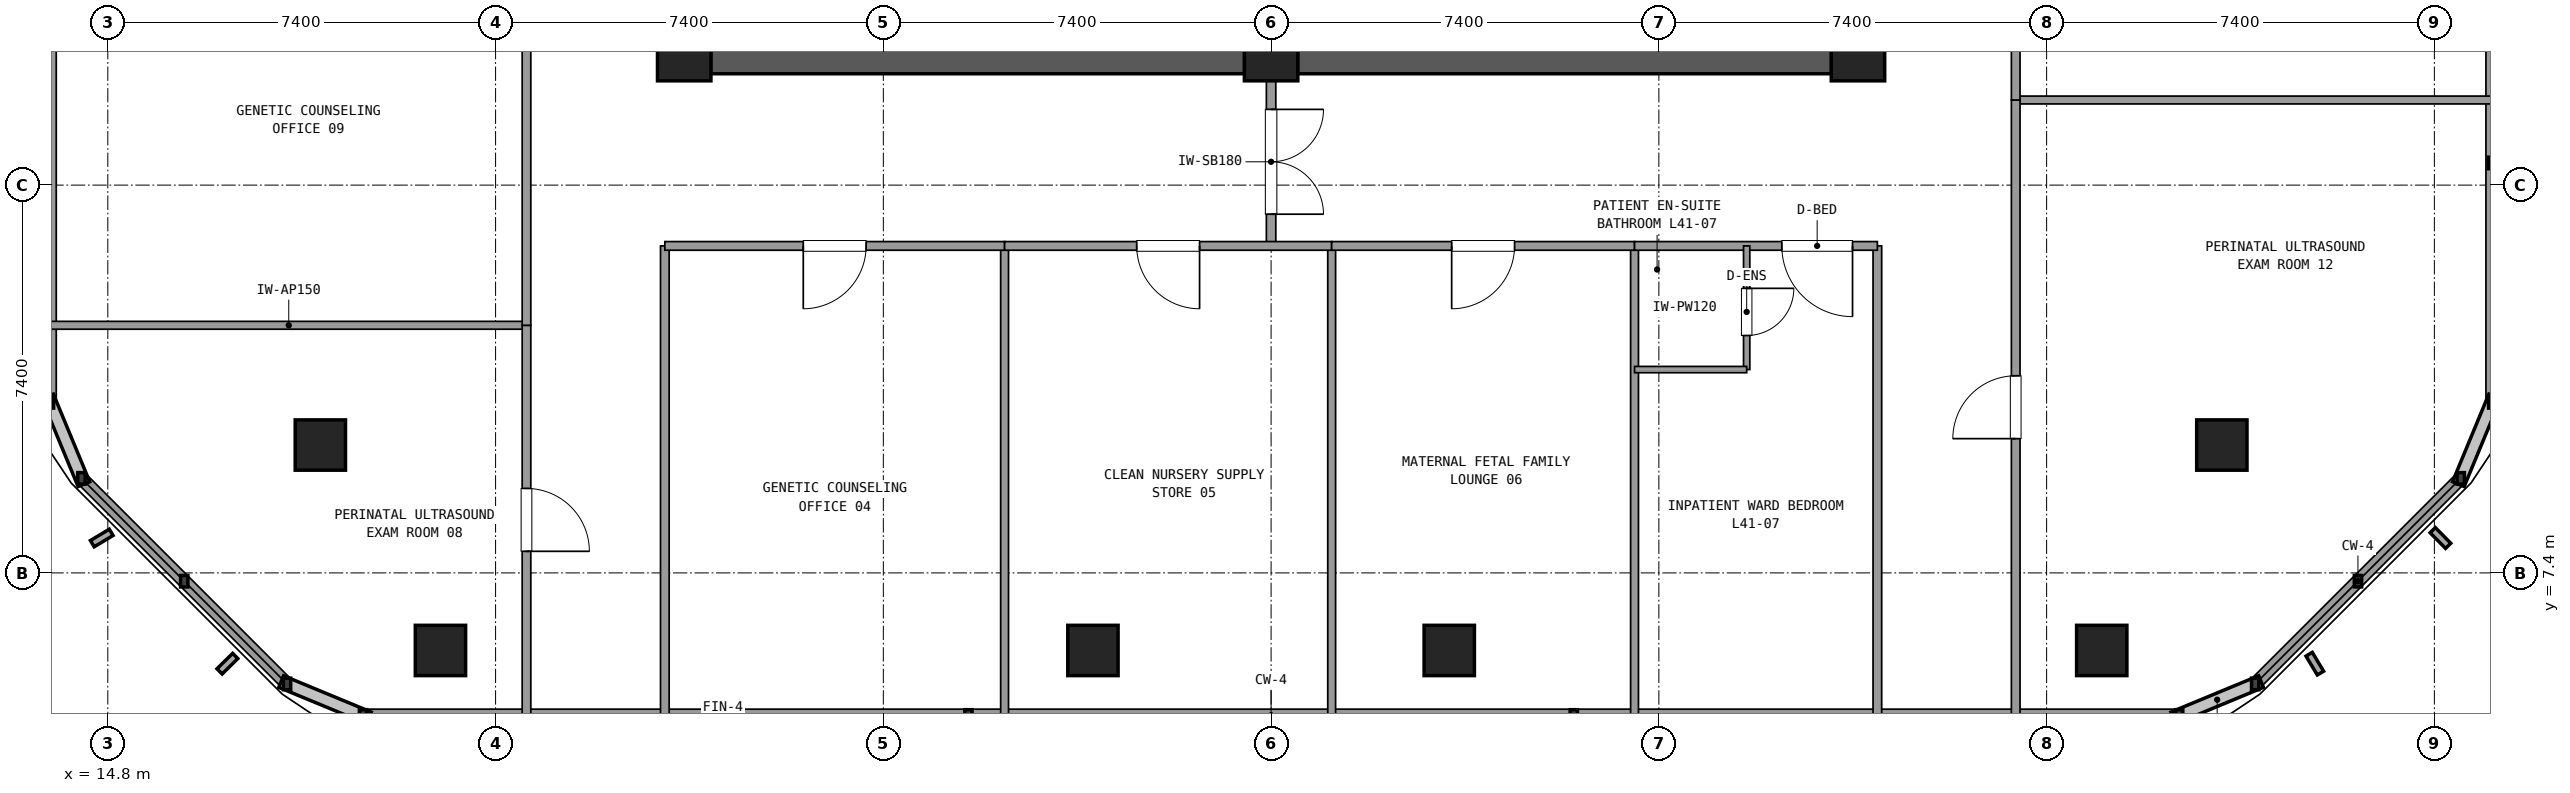
"""IFC4 building model, lengths in metres.
Left out: names, types, materials, properties, quantities, classifications, styles, units other than length and angle.
Written with IfcOpenShell. Run it as: python <this file> out.ifc"""

import sys

from ifc_helpers import new_model, si_unit, direction, frame, frame_2d, origin, origin_2d, place, context, subcontext, project, spatial, rectangle, extrude, element, fill, save


model = new_model("IFC4")
c1 = context("Model", 3, precision=1e-05, world=origin(), true_north=direction((0.0, 1.0)))
c2 = subcontext(c1, "Body", "Model", "MODEL_VIEW")
j1 = project(units=[si_unit("LENGTHUNIT", "METRE"), si_unit("PLANEANGLEUNIT", "RADIAN")], contexts=[c1])
p1 = place(None, origin())
s1 = spatial("IfcSite", under=j1, at=p1, CompositionType="ELEMENT")
p2 = place(p1, origin())
s2 = spatial("IfcBuilding", under=s1, at=p2, CompositionType="ELEMENT")
p3 = place(p2, frame((0.0, 0.0, 160.02)))
s3 = spatial("IfcBuildingStorey", under=s2, at=p3, CompositionType="ELEMENT", Elevation=160.02)
for number, where, z_axis, x_axis in (
    (1, (25.8, 17.3, 0.0), (0.0, 0.0, 1.0), (1.0, 0.0, 0.0)),
    (2, (37.0, 17.3, 0.0), (0.0, 0.0, 1.0), (1.0, 0.0, 0.0)),
    (3, (48.2, 17.3, 0.0), (0.0, 0.0, 1.0), (1.0, 0.0, 0.0)),
):
    element("IfcColumn", number, at=place(p3, frame(where, z_axis=z_axis, x_axis=x_axis)), inside=s3, PredefinedType="COLUMN", context=c2, shape_type="SweptSolid", body=[
        extrude(rectangle(XDim=1.02, YDim=1.02, at=origin_2d()), origin(), (0.0, 0.0, 1.0), 3.6),
    ])
for number, where, z_axis, x_axis in (
    (4, (26.305, 17.3, 0.0), (0.0, 0.0, 1.0), (1.0, 0.0, 0.0)),
    (5, (37.505, 17.3, 0.0), (0.0, 0.0, 1.0), (1.0, 0.0, 0.0)),
):
    element("IfcWall", number, at=place(p3, frame(where, z_axis=z_axis, x_axis=x_axis)), inside=s3, PredefinedType="SHEAR", context=c2, shape_type="SweptSolid", body=[
        extrude(rectangle(XDim=10.19, YDim=0.75, at=frame_2d((5.095, 0.0))), origin(), (0.0, 0.0, 1.0), 3.32),
    ])
for number, where, z_axis, x_axis in (
    (6, (18.856, 9.84, 0.0), (0.0, 0.0, 1.0), (1.0, 0.0, 0.0)),
    (7, (21.148, 5.92, 0.0), (0.0, 0.0, 1.0), (1.0, 0.0, 0.0)),
    (8, (33.6, 5.92, 0.0), (0.0, 0.0, 1.0), (1.0, 0.0, 0.0)),
    (9, (40.4, 5.92, 0.0), (0.0, 0.0, 1.0), (1.0, 0.0, 0.0)),
    (10, (52.852, 5.92, 0.0), (0.0, 0.0, 1.0), (1.0, 0.0, 0.0)),
    (11, (55.144, 9.84, 0.0), (0.0, 0.0, 1.0), (1.0, 0.0, 0.0)),
):
    element("IfcColumn", number, at=place(p3, frame(where, z_axis=z_axis, x_axis=x_axis)), inside=s3, PredefinedType="COLUMN", context=c2, shape_type="SweptSolid", body=[
        extrude(rectangle(XDim=0.96, YDim=0.96, at=origin_2d()), origin(), (0.0, 0.0, 1.0), 3.6),
    ])
p4 = place(p3, frame((19.671, 4.68, 0.0), z_axis=(0.0, 0.0, 1.0), x_axis=(1.0, 0.0, 0.0)))
e12 = element("IfcWall", 12, at=p4, inside=s3, PredefinedType="SOLIDWALL", context=c2, shape_type="SweptSolid", body=[
    extrude(rectangle(XDim=34.658, YDim=0.24, at=frame_2d((17.329, 0.0))), origin(), (0.0, 0.0, 1.0), 0.85),
])
p5 = place(p3, frame((55.78, 5.281, 0.0), z_axis=(0.0, 0.0, 1.0), x_axis=(0.707084777957, 0.707128783731, 0.0)))
e13 = element("IfcWall", 13, at=p5, inside=s3, PredefinedType="SOLIDWALL", context=c2, shape_type="SweptSolid", body=[
    extrude(rectangle(XDim=5.548, YDim=0.24, at=frame_2d((2.774, 0.0))), origin(), (0.0, 0.0, 1.0), 0.85),
])
p6 = place(p3, frame((60.304, 10.655, 0.0), z_axis=(0.0, 0.0, 1.0), x_axis=(0.0, 1.0, 0.0)))
e14 = element("IfcWall", 14, at=p6, inside=s3, PredefinedType="SOLIDWALL", context=c2, shape_type="SweptSolid", body=[
    extrude(rectangle(XDim=13.705, YDim=0.24, at=frame_2d((6.853, 0.0))), origin(), (0.0, 0.0, 1.0), 0.85),
])
p7 = place(p3, frame((13.696, 41.145, 0.0), z_axis=(0.0, 0.0, 1.0), x_axis=(0.0, -1.0, 0.0)))
e15 = element("IfcWall", 15, at=p7, inside=s3, PredefinedType="SOLIDWALL", context=c2, shape_type="SweptSolid", body=[
    extrude(rectangle(XDim=30.49, YDim=0.24, at=frame_2d((15.245, 0.0))), origin(), (0.0, 0.0, 1.0), 0.85),
])
p8 = place(p3, frame((14.297, 9.204, 0.0), z_axis=(0.0, 0.0, 1.0), x_axis=(0.707084777957, -0.707128783731, 0.0)))
e16 = element("IfcWall", 16, at=p8, inside=s3, PredefinedType="SOLIDWALL", context=c2, shape_type="SweptSolid", body=[
    extrude(rectangle(XDim=5.548, YDim=0.24, at=frame_2d((2.774, 0.0))), origin(), (0.0, 0.0, 1.0), 0.85),
])
p9 = place(p3, frame((37.0, 13.64, 0.0), z_axis=(0.0, 0.0, 1.0), x_axis=(0.0, 1.0, 0.0)))
e17 = element("IfcWall", 17, at=p9, inside=s3, PredefinedType="PARTITIONING", context=c2, shape_type="SweptSolid", body=[
    extrude(rectangle(XDim=3.21, YDim=0.18, at=frame_2d((1.605, 0.0))), origin(), (0.0, 0.0, 1.0), 2.61),
])
p10 = place(p9, frame((0.605, 0.0, 0.0)))
e18 = element("IfcOpeningElement", 18, at=p10, cuts=e17, PredefinedType="OPENING", context=c2, shape_type="SweptSolid", body=[
    extrude(rectangle(XDim=2.0, YDim=2.2, at=frame_2d((1.0, 1.1))), frame((0.0, 0.1, 0.0), z_axis=(0.0, -1.0, 0.0), x_axis=(1.0, 0.0, 0.0)), (0.0, 0.0, 1.0), 0.2),
])
for number, where, z_axis, x_axis in (
    (19, (25.43, 4.7, 0.0), (0.0, 0.0, 1.0), (0.0, 1.0, 0.0)),
    (20, (48.57, 4.7, 0.0), (0.0, 0.0, 1.0), (0.0, 1.0, 0.0)),
):
    element("IfcWall", number, at=place(p3, frame(where, z_axis=z_axis, x_axis=x_axis)), inside=s3, PredefinedType="PARTITIONING", context=c2, shape_type="SweptSolid", body=[
        extrude(rectangle(XDim=8.94, YDim=0.165, at=frame_2d((4.47, 0.0))), origin(), (0.0, 0.0, 1.0), 2.61),
    ])
p11 = place(p3, frame((31.914, 13.64, 0.0), z_axis=(0.0, 0.0, 1.0), x_axis=(0.0, -1.0, 0.0)))
e21 = element("IfcWall", 21, at=p11, inside=s3, PredefinedType="PARTITIONING", context=c2, shape_type="SweptSolid", body=[
    extrude(rectangle(XDim=8.94, YDim=0.15, at=frame_2d((4.47, 0.0))), origin(), (0.0, 0.0, 1.0), 2.61),
])
p12 = place(p3, frame((25.43, 13.64, 0.0), z_axis=(0.0, 0.0, 1.0), x_axis=(1.0, 0.0, 0.0)))
e22 = element("IfcWall", 22, at=p12, inside=s3, PredefinedType="PARTITIONING", context=c2, shape_type="SweptSolid", body=[
    extrude(rectangle(XDim=6.484, YDim=0.165, at=frame_2d((3.242, 0.0))), origin(), (0.0, 0.0, 1.0), 2.61),
])
p13 = place(p12, frame((2.642, 0.0, 0.0)))
e23 = element("IfcOpeningElement", 23, at=p13, cuts=e22, PredefinedType="OPENING", context=c2, shape_type="SweptSolid", body=[
    extrude(rectangle(XDim=1.2, YDim=2.15, at=frame_2d((0.6, 1.075))), frame((0.0, 0.093, 0.0), z_axis=(0.0, -1.0, 0.0), x_axis=(1.0, 0.0, 0.0)), (0.0, 0.0, 1.0), 0.185),
])
p14 = place(p3, frame((38.156, 13.64, 0.0), z_axis=(0.0, 0.0, 1.0), x_axis=(0.0, -1.0, 0.0)))
e24 = element("IfcWall", 24, at=p14, inside=s3, PredefinedType="PARTITIONING", context=c2, shape_type="SweptSolid", body=[
    extrude(rectangle(XDim=8.94, YDim=0.15, at=frame_2d((4.47, 0.0))), origin(), (0.0, 0.0, 1.0), 2.61),
])
p15 = place(p3, frame((31.914, 13.64, 0.0), z_axis=(0.0, 0.0, 1.0), x_axis=(1.0, 0.0, 0.0)))
e25 = element("IfcWall", 25, at=p15, inside=s3, PredefinedType="PARTITIONING", context=c2, shape_type="SweptSolid", body=[
    extrude(rectangle(XDim=6.242, YDim=0.165, at=frame_2d((3.121, 0.0))), origin(), (0.0, 0.0, 1.0), 2.61),
])
p16 = place(p15, frame((2.521, 0.0, 0.0)))
e26 = element("IfcOpeningElement", 26, at=p16, cuts=e25, PredefinedType="OPENING", context=c2, shape_type="SweptSolid", body=[
    extrude(rectangle(XDim=1.2, YDim=2.15, at=frame_2d((0.6, 1.075))), frame((0.0, 0.093, 0.0), z_axis=(0.0, -1.0, 0.0), x_axis=(1.0, 0.0, 0.0)), (0.0, 0.0, 1.0), 0.185),
])
p17 = place(p3, frame((43.936, 13.64, 0.0), z_axis=(0.0, 0.0, 1.0), x_axis=(0.0, -1.0, 0.0)))
e27 = element("IfcWall", 27, at=p17, inside=s3, PredefinedType="PARTITIONING", context=c2, shape_type="SweptSolid", body=[
    extrude(rectangle(XDim=8.94, YDim=0.15, at=frame_2d((4.47, 0.0))), origin(), (0.0, 0.0, 1.0), 2.61),
])
p18 = place(p3, frame((38.156, 13.64, 0.0), z_axis=(0.0, 0.0, 1.0), x_axis=(1.0, 0.0, 0.0)))
e28 = element("IfcWall", 28, at=p18, inside=s3, PredefinedType="PARTITIONING", context=c2, shape_type="SweptSolid", body=[
    extrude(rectangle(XDim=5.78, YDim=0.165, at=frame_2d((2.89, 0.0))), origin(), (0.0, 0.0, 1.0), 2.61),
])
p19 = place(p18, frame((2.29, 0.0, 0.0)))
e29 = element("IfcOpeningElement", 29, at=p19, cuts=e28, PredefinedType="OPENING", context=c2, shape_type="SweptSolid", body=[
    extrude(rectangle(XDim=1.2, YDim=2.15, at=frame_2d((0.6, 1.075))), frame((0.0, 0.093, 0.0), z_axis=(0.0, -1.0, 0.0), x_axis=(1.0, 0.0, 0.0)), (0.0, 0.0, 1.0), 0.185),
])
p20 = place(p3, frame((43.936, 13.64, 0.0), z_axis=(0.0, 0.0, 1.0), x_axis=(1.0, 0.0, 0.0)))
e30 = element("IfcWall", 30, at=p20, inside=s3, PredefinedType="PARTITIONING", context=c2, shape_type="SweptSolid", body=[
    extrude(rectangle(XDim=4.634, YDim=0.165, at=frame_2d((2.317, 0.0))), origin(), (0.0, 0.0, 1.0), 2.61),
])
p21 = place(p20, frame((2.81, 0.0, 0.0)))
e31 = element("IfcOpeningElement", 31, at=p21, cuts=e30, PredefinedType="OPENING", context=c2, shape_type="SweptSolid", body=[
    extrude(rectangle(XDim=1.35, YDim=2.15, at=frame_2d((0.675, 1.075))), frame((0.0, 0.093, 0.0), z_axis=(0.0, -1.0, 0.0), x_axis=(1.0, 0.0, 0.0)), (0.0, 0.0, 1.0), 0.185),
])
p22 = place(p3, frame((46.076, 11.28, 0.0), z_axis=(0.0, 0.0, 1.0), x_axis=(0.0, 1.0, 0.0)))
e32 = element("IfcWall", 32, at=p22, inside=s3, PredefinedType="PLUMBINGWALL", context=c2, shape_type="SweptSolid", body=[
    extrude(rectangle(XDim=2.36, YDim=0.12, at=frame_2d((1.18, 0.0))), origin(), (0.0, 0.0, 1.0), 2.61),
])
p23 = place(p22, frame((0.65, 0.0, 0.0)))
e33 = element("IfcOpeningElement", 33, at=p23, cuts=e32, PredefinedType="OPENING", context=c2, shape_type="SweptSolid", body=[
    extrude(rectangle(XDim=0.9, YDim=2.1, at=frame_2d((0.45, 1.05))), frame((0.0, 0.07, 0.0), z_axis=(0.0, -1.0, 0.0), x_axis=(1.0, 0.0, 0.0)), (0.0, 0.0, 1.0), 0.14),
])
p24 = place(p3, frame((43.936, 11.28, 0.0), z_axis=(0.0, 0.0, 1.0), x_axis=(1.0, 0.0, 0.0)))
e34 = element("IfcWall", 34, at=p24, inside=s3, PredefinedType="PLUMBINGWALL", context=c2, shape_type="SweptSolid", body=[
    extrude(rectangle(XDim=2.14, YDim=0.12, at=frame_2d((1.07, 0.0))), origin(), (0.0, 0.0, 1.0), 2.61),
])
p25 = place(p3, frame((22.79, 12.125, 0.0), z_axis=(0.0, 0.0, 1.0), x_axis=(-1.0, 0.0, 0.0)))
e35 = element("IfcWall", 35, at=p25, inside=s3, PredefinedType="PARTITIONING", context=c2, shape_type="SweptSolid", body=[
    extrude(rectangle(XDim=9.074, YDim=0.15, at=frame_2d((4.537, 0.0))), origin(), (0.0, 0.0, 1.0), 2.61),
])
p26 = place(p3, frame((22.79, 4.7, 0.0), z_axis=(0.0, 0.0, 1.0), x_axis=(0.0, 1.0, 0.0)))
e36 = element("IfcWall", 36, at=p26, inside=s3, PredefinedType="PARTITIONING", context=c2, shape_type="SweptSolid", body=[
    extrude(rectangle(XDim=7.425, YDim=0.165, at=frame_2d((3.712, 0.0))), origin(), (0.0, 0.0, 1.0), 2.61),
])
p27 = place(p26, frame((3.112, 0.0, 0.0)))
e37 = element("IfcOpeningElement", 37, at=p27, cuts=e36, PredefinedType="OPENING", context=c2, shape_type="SweptSolid", body=[
    extrude(rectangle(XDim=1.2, YDim=2.15, at=frame_2d((0.6, 1.075))), frame((0.0, 0.093, 0.0), z_axis=(0.0, -1.0, 0.0), x_axis=(1.0, 0.0, 0.0)), (0.0, 0.0, 1.0), 0.185),
])
p28 = place(p3, frame((22.79, 12.125, 0.0), z_axis=(0.0, 0.0, 1.0), x_axis=(0.0, 1.0, 0.0)))
e38 = element("IfcWall", 38, at=p28, inside=s3, PredefinedType="PARTITIONING", context=c2, shape_type="SweptSolid", body=[
    extrude(rectangle(XDim=12.115, YDim=0.165, at=frame_2d((6.058, 0.0))), origin(), (0.0, 0.0, 1.0), 2.61),
])
p29 = place(p28, frame((5.457, 0.0, 0.0)))
e39 = element("IfcOpeningElement", 39, at=p29, cuts=e38, PredefinedType="OPENING", context=c2, shape_type="SweptSolid", body=[
    extrude(rectangle(XDim=1.2, YDim=2.15, at=frame_2d((0.6, 1.075))), frame((0.0, 0.093, 0.0), z_axis=(0.0, -1.0, 0.0), x_axis=(1.0, 0.0, 0.0)), (0.0, 0.0, 1.0), 0.185),
])
p30 = place(p3, frame((51.21, 16.424, 0.0), z_axis=(0.0, 0.0, 1.0), x_axis=(1.0, 0.0, 0.0)))
e40 = element("IfcWall", 40, at=p30, inside=s3, PredefinedType="PARTITIONING", context=c2, shape_type="SweptSolid", body=[
    extrude(rectangle(XDim=9.074, YDim=0.15, at=frame_2d((4.537, 0.0))), origin(), (0.0, 0.0, 1.0), 2.61),
])
p31 = place(p3, frame((51.21, 4.7, 0.0), z_axis=(0.0, 0.0, 1.0), x_axis=(0.0, 1.0, 0.0)))
e41 = element("IfcWall", 41, at=p31, inside=s3, PredefinedType="PARTITIONING", context=c2, shape_type="SweptSolid", body=[
    extrude(rectangle(XDim=11.724, YDim=0.165, at=frame_2d((5.862, 0.0))), origin(), (0.0, 0.0, 1.0), 2.61),
])
p32 = place(p31, frame((5.262, 0.0, 0.0)))
e42 = element("IfcOpeningElement", 42, at=p32, cuts=e41, PredefinedType="OPENING", context=c2, shape_type="SweptSolid", body=[
    extrude(rectangle(XDim=1.2, YDim=2.15, at=frame_2d((0.6, 1.075))), frame((0.0, 0.093, 0.0), z_axis=(0.0, -1.0, 0.0), x_axis=(1.0, 0.0, 0.0)), (0.0, 0.0, 1.0), 0.185),
])
p33 = place(p3, frame((51.21, 16.424, 0.0), z_axis=(0.0, 0.0, 1.0), x_axis=(0.0, 1.0, 0.0)))
e43 = element("IfcWall", 43, at=p33, inside=s3, PredefinedType="PARTITIONING", context=c2, shape_type="SweptSolid", body=[
    extrude(rectangle(XDim=7.816, YDim=0.165, at=frame_2d((3.908, 0.0))), origin(), (0.0, 0.0, 1.0), 2.61),
])
p34 = place(p33, frame((3.308, 0.0, 0.0)))
e44 = element("IfcOpeningElement", 44, at=p34, cuts=e43, PredefinedType="OPENING", context=c2, shape_type="SweptSolid", body=[
    extrude(rectangle(XDim=1.2, YDim=2.15, at=frame_2d((0.6, 1.075))), frame((0.0, 0.093, 0.0), z_axis=(0.0, -1.0, 0.0), x_axis=(1.0, 0.0, 0.0)), (0.0, 0.0, 1.0), 0.185),
])
p35 = place(p10, frame((2.0, 0.0, 0.0), z_axis=(0.0, 0.0, 1.0), x_axis=(-1.0, 0.0, 0.0)))
e45 = element("IfcDoor", 45, at=p35, inside=s3, OperationType="DOUBLE_DOOR_SINGLE_SWING", PredefinedType="DOOR", context=c2, shape_type="SweptSolid", body=[
    extrude(rectangle(XDim=2.0, YDim=2.2, at=frame_2d((1.0, 1.1))), frame((0.0, 0.025, 0.0), z_axis=(0.0, -1.0, 0.0), x_axis=(1.0, 0.0, 0.0)), (0.0, 0.0, 1.0), 0.05),
])
fill(e18, e45)
p36 = place(p13, frame((1.2, 0.0, 0.0), z_axis=(0.0, 0.0, 1.0), x_axis=(-1.0, 0.0, 0.0)))
e46 = element("IfcDoor", 46, at=p36, inside=s3, OperationType="SINGLE_SWING_LEFT", PredefinedType="DOOR", context=c2, shape_type="SweptSolid", body=[
    extrude(rectangle(XDim=1.2, YDim=2.15, at=frame_2d((0.6, 1.075))), frame((0.0, 0.025, 0.0), z_axis=(0.0, -1.0, 0.0), x_axis=(1.0, 0.0, 0.0)), (0.0, 0.0, 1.0), 0.05),
])
fill(e23, e46)
p37 = place(p16, frame((1.2, 0.0, 0.0), z_axis=(0.0, 0.0, 1.0), x_axis=(-1.0, 0.0, 0.0)))
e47 = element("IfcDoor", 47, at=p37, inside=s3, OperationType="SINGLE_SWING_RIGHT", PredefinedType="DOOR", context=c2, shape_type="SweptSolid", body=[
    extrude(rectangle(XDim=1.2, YDim=2.15, at=frame_2d((0.6, 1.075))), frame((0.0, 0.025, 0.0), z_axis=(0.0, -1.0, 0.0), x_axis=(1.0, 0.0, 0.0)), (0.0, 0.0, 1.0), 0.05),
])
fill(e26, e47)
p38 = place(p19, frame((1.2, 0.0, 0.0), z_axis=(0.0, 0.0, 1.0), x_axis=(-1.0, 0.0, 0.0)))
e48 = element("IfcDoor", 48, at=p38, inside=s3, OperationType="SINGLE_SWING_LEFT", PredefinedType="DOOR", context=c2, shape_type="SweptSolid", body=[
    extrude(rectangle(XDim=1.2, YDim=2.15, at=frame_2d((0.6, 1.075))), frame((0.0, 0.025, 0.0), z_axis=(0.0, -1.0, 0.0), x_axis=(1.0, 0.0, 0.0)), (0.0, 0.0, 1.0), 0.05),
])
fill(e29, e48)
p39 = place(p23, frame((0.9, 0.0, 0.0), z_axis=(0.0, 0.0, 1.0), x_axis=(-1.0, 0.0, 0.0)))
e49 = element("IfcDoor", 49, at=p39, inside=s3, OperationType="SINGLE_SWING_RIGHT", PredefinedType="DOOR", context=c2, shape_type="SweptSolid", body=[
    extrude(rectangle(XDim=0.9, YDim=2.1, at=frame_2d((0.45, 1.05))), frame((0.0, 0.025, 0.0), z_axis=(0.0, -1.0, 0.0), x_axis=(1.0, 0.0, 0.0)), (0.0, 0.0, 1.0), 0.05),
])
fill(e33, e49)
p40 = place(p21, frame((1.35, 0.0, 0.0), z_axis=(0.0, 0.0, 1.0), x_axis=(-1.0, 0.0, 0.0)))
e50 = element("IfcDoor", 50, at=p40, inside=s3, OperationType="SINGLE_SWING_RIGHT", PredefinedType="DOOR", context=c2, shape_type="SweptSolid", body=[
    extrude(rectangle(XDim=1.35, YDim=2.15, at=frame_2d((0.675, 1.075))), frame((0.0, 0.025, 0.0), z_axis=(0.0, -1.0, 0.0), x_axis=(1.0, 0.0, 0.0)), (0.0, 0.0, 1.0), 0.05),
])
fill(e31, e50)
p41 = place(p27, frame((1.2, 0.0, 0.0), z_axis=(0.0, 0.0, 1.0), x_axis=(-1.0, 0.0, 0.0)))
e51 = element("IfcDoor", 51, at=p41, inside=s3, OperationType="SINGLE_SWING_LEFT", PredefinedType="DOOR", context=c2, shape_type="SweptSolid", body=[
    extrude(rectangle(XDim=1.2, YDim=2.15, at=frame_2d((0.6, 1.075))), frame((0.0, 0.025, 0.0), z_axis=(0.0, -1.0, 0.0), x_axis=(1.0, 0.0, 0.0)), (0.0, 0.0, 1.0), 0.05),
])
fill(e37, e51)
p42 = place(p32, origin())
e52 = element("IfcDoor", 52, at=p42, inside=s3, OperationType="SINGLE_SWING_LEFT", PredefinedType="DOOR", context=c2, shape_type="SweptSolid", body=[
    extrude(rectangle(XDim=1.2, YDim=2.15, at=frame_2d((0.6, 1.075))), frame((0.0, 0.025, 0.0), z_axis=(0.0, -1.0, 0.0), x_axis=(1.0, 0.0, 0.0)), (0.0, 0.0, 1.0), 0.05),
])
fill(e42, e52)
save(model, sys.argv[1])
